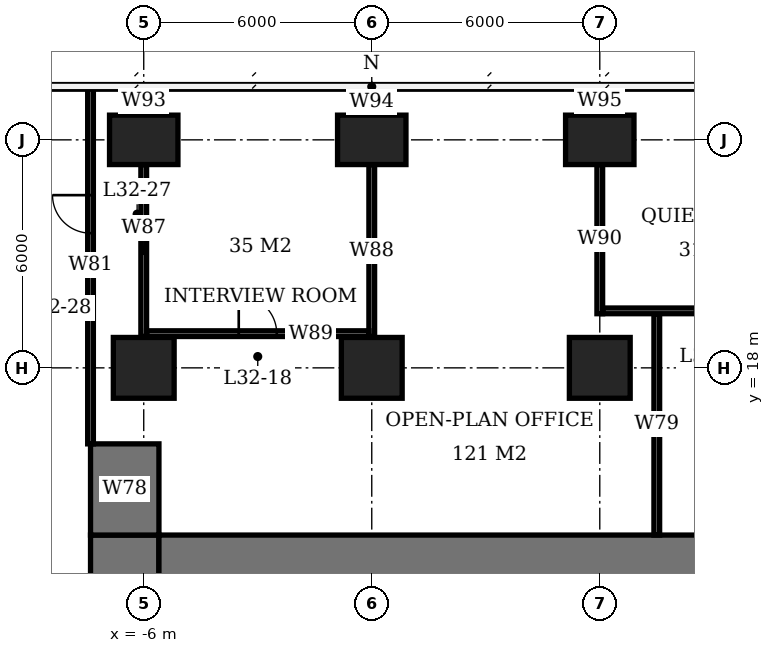
"""IFC4 building model, lengths in metres.
Left out: names, types, materials, properties, quantities, classifications, styles, units other than length and angle.
Written with IfcOpenShell. Run it as: python <this file> out.ifc"""

import sys

from ifc_helpers import new_model, si_unit, direction, frame, frame_2d, origin, origin_2d, place, context, subcontext, project, spatial, rectangle, extrude, element, fill, save


model = new_model("IFC4")
c1 = context("Model", 3, precision=1e-05, world=origin(), true_north=direction((0.0, 1.0)))
c2 = subcontext(c1, "Body", "Model", "MODEL_VIEW")
j1 = project(units=[si_unit("LENGTHUNIT", "METRE"), si_unit("PLANEANGLEUNIT", "RADIAN")], contexts=[c1])
p1 = place(None, origin())
s1 = spatial("IfcSite", under=j1, at=p1, CompositionType="ELEMENT")
p2 = place(p1, origin())
s2 = spatial("IfcBuilding", under=s1, at=p2, CompositionType="ELEMENT")
p3 = place(p2, frame((0.0, 0.0, 132.8)))
s3 = spatial("IfcBuildingStorey", under=s2, at=p3, CompositionType="ELEMENT", Elevation=132.8)
p4 = place(p3, frame((-6.0, 18.0, 0.0), z_axis=(0.0, 0.0, 1.0), x_axis=(1.0, 0.0, 0.0)))
e1 = element("IfcColumn", 1, at=p4, inside=s3, PredefinedType="COLUMN", context=c2, shape_type="SweptSolid", body=[
    extrude(rectangle(XDim=1.6, YDim=1.6, at=origin_2d()), origin(), (0.0, 0.0, 1.0), 3.9),
])
p5 = place(p3, frame((-6.0, 24.0, 0.0), z_axis=(0.0, 0.0, 1.0), x_axis=(1.0, 0.0, 0.0)))
e2 = element("IfcColumn", 2, at=p5, inside=s3, PredefinedType="COLUMN", context=c2, shape_type="SweptSolid", body=[
    extrude(rectangle(XDim=1.8, YDim=1.3, at=origin_2d()), origin(), (0.0, 0.0, 1.0), 3.9),
])
p6 = place(p3, frame((0.0, 18.0, 0.0), z_axis=(0.0, 0.0, 1.0), x_axis=(1.0, 0.0, 0.0)))
e3 = element("IfcColumn", 3, at=p6, inside=s3, PredefinedType="COLUMN", context=c2, shape_type="SweptSolid", body=[
    extrude(rectangle(XDim=1.6, YDim=1.6, at=origin_2d()), origin(), (0.0, 0.0, 1.0), 3.9),
])
p7 = place(p3, frame((0.0, 24.0, 0.0), z_axis=(0.0, 0.0, 1.0), x_axis=(1.0, 0.0, 0.0)))
e4 = element("IfcColumn", 4, at=p7, inside=s3, PredefinedType="COLUMN", context=c2, shape_type="SweptSolid", body=[
    extrude(rectangle(XDim=1.8, YDim=1.3, at=origin_2d()), origin(), (0.0, 0.0, 1.0), 3.9),
])
p8 = place(p3, frame((6.0, 18.0, 0.0), z_axis=(0.0, 0.0, 1.0), x_axis=(1.0, 0.0, 0.0)))
e5 = element("IfcColumn", 5, at=p8, inside=s3, PredefinedType="COLUMN", context=c2, shape_type="SweptSolid", body=[
    extrude(rectangle(XDim=1.6, YDim=1.6, at=origin_2d()), origin(), (0.0, 0.0, 1.0), 3.9),
])
p9 = place(p3, frame((6.0, 24.0, 0.0), z_axis=(0.0, 0.0, 1.0), x_axis=(1.0, 0.0, 0.0)))
e6 = element("IfcColumn", 6, at=p9, inside=s3, PredefinedType="COLUMN", context=c2, shape_type="SweptSolid", body=[
    extrude(rectangle(XDim=1.8, YDim=1.3, at=origin_2d()), origin(), (0.0, 0.0, 1.0), 3.9),
])
p10 = place(p3, frame((-5.6, 12.6, 0.0), z_axis=(0.0, 0.0, 1.0), x_axis=(1.0, 0.0, 0.0)))
e7 = element("IfcWall", 7, at=p10, inside=s3, PredefinedType="SHEAR", context=c2, shape_type="SweptSolid", body=[
    extrude(rectangle(XDim=23.2, YDim=2.0, at=frame_2d((11.6, 0.0))), origin(), (0.0, 0.0, 1.0), 3.9),
])
p11 = place(p3, frame((-6.5, -7.6, 0.0), z_axis=(0.0, 0.0, 1.0), x_axis=(0.0, 1.0, 0.0)))
e8 = element("IfcWall", 8, at=p11, inside=s3, PredefinedType="SHEAR", context=c2, shape_type="SweptSolid", body=[
    extrude(rectangle(XDim=21.2, YDim=1.8, at=frame_2d((10.6, 0.0))), origin(), (0.0, 0.0, 1.0), 3.9),
])
p12 = place(p11, frame((7.8, 0.0, 0.0)))
e9 = element("IfcOpeningElement", 9, at=p12, cuts=e8, PredefinedType="OPENING", context=c2, shape_type="SweptSolid", body=[
    extrude(rectangle(XDim=1.8, YDim=2.4, at=frame_2d((0.9, 1.2))), frame((0.0, 0.91, 0.0), z_axis=(0.0, -1.0, 0.0), x_axis=(1.0, 0.0, 0.0)), (0.0, 0.0, 1.0), 1.82),
])
p13 = place(p3, frame((-6.5, 13.6, 0.0), z_axis=(0.0, 0.0, 1.0), x_axis=(0.0, 1.0, 0.0)))
e10 = element("IfcWall", 10, at=p13, inside=s3, PredefinedType="SHEAR", context=c2, shape_type="SweptSolid", body=[
    extrude(rectangle(XDim=2.4, YDim=1.8, at=frame_2d((1.2, 0.0))), origin(), (0.0, 0.0, 1.0), 3.9),
])
p14 = place(p3, frame((-5.925, 18.9, 0.0), z_axis=(0.0, 0.0, 1.0), x_axis=(1.0, 0.0, 0.0)))
e11 = element("IfcWall", 11, at=p14, inside=s3, PredefinedType="PARTITIONING", context=c2, shape_type="SweptSolid", body=[
    extrude(rectangle(XDim=5.85, YDim=0.15, at=frame_2d((2.925, 0.0))), origin(), (0.0, 0.0, 1.0), 3.65),
])
p15 = place(p14, frame((2.425, 0.0, 0.0)))
e12 = element("IfcOpeningElement", 12, at=p15, cuts=e11, PredefinedType="OPENING", context=c2, shape_type="SweptSolid", body=[
    extrude(rectangle(XDim=1.0, YDim=2.1, at=frame_2d((0.5, 1.05))), frame((0.0, 0.085, 0.0), z_axis=(0.0, -1.0, 0.0), x_axis=(1.0, 0.0, 0.0)), (0.0, 0.0, 1.0), 0.17),
])
p16 = place(p3, frame((6.075, 19.5, 0.0), z_axis=(0.0, 0.0, 1.0), x_axis=(1.0, 0.0, 0.0)))
e13 = element("IfcWall", 13, at=p16, inside=s3, PredefinedType="PARTITIONING", context=c2, shape_type="SweptSolid", body=[
    extrude(rectangle(XDim=5.85, YDim=0.15, at=frame_2d((2.925, 0.0))), origin(), (0.0, 0.0, 1.0), 3.65),
])
p17 = place(p16, frame((2.425, 0.0, 0.0)))
e14 = element("IfcOpeningElement", 14, at=p17, cuts=e13, PredefinedType="OPENING", context=c2, shape_type="SweptSolid", body=[
    extrude(rectangle(XDim=1.0, YDim=2.1, at=frame_2d((0.5, 1.05))), frame((0.0, 0.085, 0.0), z_axis=(0.0, -1.0, 0.0), x_axis=(1.0, 0.0, 0.0)), (0.0, 0.0, 1.0), 0.17),
])
p18 = place(p3, frame((-6.0, 18.825, 0.0), z_axis=(0.0, 0.0, 1.0), x_axis=(0.0, 1.0, 0.0)))
e15 = element("IfcWall", 15, at=p18, inside=s3, PredefinedType="PARTITIONING", context=c2, shape_type="SweptSolid", body=[
    extrude(rectangle(XDim=4.525, YDim=0.15, at=frame_2d((2.263, 0.0))), origin(), (0.0, 0.0, 1.0), 3.65),
])
p19 = place(p3, frame((-6.0, 24.65, 0.0), z_axis=(0.0, 0.0, 1.0), x_axis=(0.0, 1.0, 0.0)))
e16 = element("IfcWall", 16, at=p19, inside=s3, PredefinedType="PARTITIONING", context=c2, shape_type="SweptSolid", body=[
    extrude(rectangle(XDim=0.75, YDim=0.15, at=frame_2d((0.375, 0.0))), origin(), (0.0, 0.0, 1.0), 3.65),
])
p20 = place(p3, frame((0.0, 18.825, 0.0), z_axis=(0.0, 0.0, 1.0), x_axis=(0.0, 1.0, 0.0)))
e17 = element("IfcWall", 17, at=p20, inside=s3, PredefinedType="PARTITIONING", context=c2, shape_type="SweptSolid", body=[
    extrude(rectangle(XDim=4.525, YDim=0.15, at=frame_2d((2.263, 0.0))), origin(), (0.0, 0.0, 1.0), 3.65),
])
p21 = place(p3, frame((0.0, 24.65, 0.0), z_axis=(0.0, 0.0, 1.0), x_axis=(0.0, 1.0, 0.0)))
e18 = element("IfcWall", 18, at=p21, inside=s3, PredefinedType="PARTITIONING", context=c2, shape_type="SweptSolid", body=[
    extrude(rectangle(XDim=0.7, YDim=0.15, at=frame_2d((0.35, 0.0))), origin(), (0.0, 0.0, 1.0), 3.65),
])
p22 = place(p3, frame((6.0, 19.425, 0.0), z_axis=(0.0, 0.0, 1.0), x_axis=(0.0, 1.0, 0.0)))
e19 = element("IfcWall", 19, at=p22, inside=s3, PredefinedType="PARTITIONING", context=c2, shape_type="SweptSolid", body=[
    extrude(rectangle(XDim=3.925, YDim=0.15, at=frame_2d((1.962, 0.0))), origin(), (0.0, 0.0, 1.0), 3.65),
])
p23 = place(p3, frame((6.0, 24.65, 0.0), z_axis=(0.0, 0.0, 1.0), x_axis=(0.0, 1.0, 0.0)))
e20 = element("IfcWall", 20, at=p23, inside=s3, PredefinedType="PARTITIONING", context=c2, shape_type="SweptSolid", body=[
    extrude(rectangle(XDim=0.75, YDim=0.15, at=frame_2d((0.375, 0.0))), origin(), (0.0, 0.0, 1.0), 3.65),
])
p24 = place(p3, frame((-7.4, 16.0, 0.0), z_axis=(0.0, 0.0, 1.0), x_axis=(0.0, 1.0, 0.0)))
e21 = element("IfcWall", 21, at=p24, inside=s3, PredefinedType="PARTITIONING", context=c2, shape_type="SweptSolid", body=[
    extrude(rectangle(XDim=9.4, YDim=0.15, at=frame_2d((4.7, 0.0))), origin(), (0.0, 0.0, 1.0), 3.65),
])
p25 = place(p24, frame((5.545, 0.0, 0.0)))
e22 = element("IfcOpeningElement", 22, at=p25, cuts=e21, PredefinedType="OPENING", context=c2, shape_type="SweptSolid", body=[
    extrude(rectangle(XDim=1.0, YDim=2.1, at=frame_2d((0.5, 1.05))), frame((0.0, 0.085, 0.0), z_axis=(0.0, -1.0, 0.0), x_axis=(1.0, 0.0, 0.0)), (0.0, 0.0, 1.0), 0.17),
])
p26 = place(p3, frame((7.5, 13.6, 0.0), z_axis=(0.0, 0.0, 1.0), x_axis=(0.0, 1.0, 0.0)))
e23 = element("IfcWall", 23, at=p26, inside=s3, PredefinedType="PARTITIONING", context=c2, shape_type="SweptSolid", body=[
    extrude(rectangle(XDim=5.825, YDim=0.15, at=frame_2d((2.913, 0.0))), origin(), (0.0, 0.0, 1.0), 3.65),
])
p27 = place(p15, origin())
e24 = element("IfcDoor", 24, at=p27, inside=s3, OperationType="SINGLE_SWING_LEFT", PredefinedType="DOOR", context=c2, shape_type="SweptSolid", body=[
    extrude(rectangle(XDim=1.0, YDim=2.1, at=frame_2d((0.5, 1.05))), frame((0.0, 0.025, 0.0), z_axis=(0.0, -1.0, 0.0), x_axis=(1.0, 0.0, 0.0)), (0.0, 0.0, 1.0), 0.05),
])
fill(e12, e24)
p28 = place(p25, origin())
e25 = element("IfcDoor", 25, at=p28, inside=s3, OperationType="SINGLE_SWING_RIGHT", PredefinedType="DOOR", context=c2, shape_type="SweptSolid", body=[
    extrude(rectangle(XDim=1.0, YDim=2.1, at=frame_2d((0.5, 1.05))), frame((0.0, 0.025, 0.0), z_axis=(0.0, -1.0, 0.0), x_axis=(1.0, 0.0, 0.0)), (0.0, 0.0, 1.0), 0.05),
])
fill(e22, e25)
save(model, sys.argv[1])
